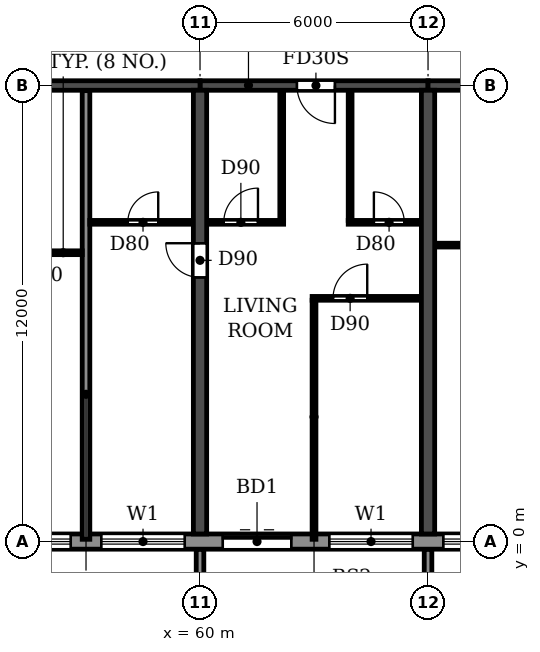
"""IFC4 building model, lengths in metres.
Left out: names, types, materials, properties, quantities, classifications, styles, units other than length and angle.
Written with IfcOpenShell. Run it as: python <this file> out.ifc"""

import sys

from ifc_helpers import new_model, si_unit, direction, frame, frame_2d, origin, place, context, subcontext, project, spatial, polyline, rectangle, outline, extrude, source, transform, mapped, element, fill, save


model = new_model("IFC4")
c1 = context("Model", 3, precision=1e-05, world=origin(), true_north=direction((0.0, 1.0)))
c2 = subcontext(c1, "Body", "Model", "MODEL_VIEW")
j1 = project(units=[si_unit("LENGTHUNIT", "METRE"), si_unit("PLANEANGLEUNIT", "RADIAN")], contexts=[c1])
p1 = place(None, origin())
s1 = spatial("IfcSite", under=j1, at=p1, CompositionType="ELEMENT")
p2 = place(p1, origin())
s2 = spatial("IfcBuilding", under=s1, at=p2, CompositionType="ELEMENT")
p3 = place(p2, frame((0.0, 0.0, 76.2)))
s3 = spatial("IfcBuildingStorey", under=s2, at=p3, CompositionType="ELEMENT", Elevation=76.2)
p4 = place(p3, frame((60.0, 0.2, 0.0), z_axis=(0.0, 0.0, 1.0), x_axis=(0.0, 1.0, 0.0)))
e1 = element("IfcWall", 1, at=p4, inside=s3, PredefinedType="SHEAR", context=c2, shape_type="SweptSolid", body=[
    extrude(rectangle(XDim=11.675, YDim=0.35, at=frame_2d((5.837, 0.0))), origin(), (0.0, 0.0, 1.0), 3.06),
])
p5 = place(p4, frame((6.75, 0.0, 0.0)))
e2 = element("IfcOpeningElement", 2, at=p5, cuts=e1, PredefinedType="OPENING", context=c2, shape_type="SweptSolid", body=[
    extrude(rectangle(XDim=0.9, YDim=2.1, at=frame_2d((0.45, 1.05))), frame((0.0, 0.185, 0.0), z_axis=(0.0, -1.0, 0.0), x_axis=(1.0, 0.0, 0.0)), (0.0, 0.0, 1.0), 0.37),
])
p6 = place(p3, frame((66.0, 0.2, 0.0), z_axis=(0.0, 0.0, 1.0), x_axis=(0.0, 1.0, 0.0)))
e3 = element("IfcWall", 3, at=p6, inside=s3, PredefinedType="SHEAR", context=c2, shape_type="SweptSolid", body=[
    extrude(rectangle(XDim=11.675, YDim=0.35, at=frame_2d((5.837, 0.0))), origin(), (0.0, 0.0, 1.0), 3.06),
])
p7 = place(p3, frame((54.0, 12.0, 0.0), z_axis=(0.0, 0.0, 1.0), x_axis=(1.0, 0.0, 0.0)))
e4 = element("IfcWall", 4, at=p7, inside=s3, PredefinedType="SHEAR", context=c2, shape_type="SweptSolid", body=[
    extrude(rectangle(XDim=6.0, YDim=0.25, at=frame_2d((3.0, 0.0))), origin(), (0.0, 0.0, 1.0), 2.46),
])
p8 = place(p3, frame((60.0, 12.0, 0.0), z_axis=(0.0, 0.0, 1.0), x_axis=(1.0, 0.0, 0.0)))
e5 = element("IfcWall", 5, at=p8, inside=s3, PredefinedType="SHEAR", context=c2, shape_type="SweptSolid", body=[
    extrude(rectangle(XDim=6.0, YDim=0.25, at=frame_2d((3.0, 0.0))), origin(), (0.0, 0.0, 1.0), 2.46),
])
p9 = place(p8, frame((2.55, 0.0, 0.0)))
e6 = element("IfcOpeningElement", 6, at=p9, cuts=e5, PredefinedType="OPENING", context=c2, shape_type="SweptSolid", body=[
    extrude(rectangle(XDim=1.0, YDim=2.1, at=frame_2d((0.5, 1.05))), frame((0.0, 0.135, 0.0), z_axis=(0.0, -1.0, 0.0), x_axis=(1.0, 0.0, 0.0)), (0.0, 0.0, 1.0), 0.27),
])
p10 = place(p3, frame((66.0, 12.0, 0.0), z_axis=(0.0, 0.0, 1.0), x_axis=(1.0, 0.0, 0.0)))
e7 = element("IfcWall", 7, at=p10, inside=s3, PredefinedType="SHEAR", context=c2, shape_type="SweptSolid", body=[
    extrude(rectangle(XDim=6.0, YDim=0.25, at=frame_2d((3.0, 0.0))), origin(), (0.0, 0.0, 1.0), 2.46),
])
p11 = place(p10, frame((2.55, 0.0, 0.0)))
e8 = element("IfcOpeningElement", 8, at=p11, cuts=e7, PredefinedType="OPENING", context=c2, shape_type="SweptSolid", body=[
    extrude(rectangle(XDim=1.0, YDim=2.1, at=frame_2d((0.5, 1.05))), frame((0.0, 0.135, 0.0), z_axis=(0.0, -1.0, 0.0), x_axis=(1.0, 0.0, 0.0)), (0.0, 0.0, 1.0), 0.27),
])
p12 = place(p3, frame((10.683, 0.0, 0.0), z_axis=(0.0, 0.0, 1.0), x_axis=(1.0, 0.0, 0.0)))
e9 = element("IfcWall", 9, at=p12, inside=s3, PredefinedType="STANDARD", context=c2, shape_type="SweptSolid", body=[
    extrude(rectangle(XDim=80.634, YDim=0.4, at=frame_2d((40.317, 0.0))), origin(), (0.0, 0.0, 1.0), 3.06),
])
p13 = place(p12, frame((1.717, 0.0, 0.9)))
e10 = element("IfcOpeningElement", 10, at=p13, cuts=e9, PredefinedType="OPENING", context=c2, shape_type="SweptSolid", body=[
    extrude(rectangle(XDim=2.2, YDim=1.5, at=frame_2d((1.1, 0.75))), frame((0.0, 0.21, 0.0), z_axis=(0.0, -1.0, 0.0), x_axis=(1.0, 0.0, 0.0)), (0.0, 0.0, 1.0), 0.42),
])
p14 = place(p12, frame((4.917, 0.0, 0.0)))
e11 = element("IfcOpeningElement", 11, at=p14, cuts=e9, PredefinedType="OPENING", context=c2, shape_type="SweptSolid", body=[
    extrude(rectangle(XDim=1.8, YDim=2.4, at=frame_2d((0.9, 1.2))), frame((0.0, 0.21, 0.0), z_axis=(0.0, -1.0, 0.0), x_axis=(1.0, 0.0, 0.0)), (0.0, 0.0, 1.0), 0.42),
])
p15 = place(p12, frame((7.717, 0.0, 0.9)))
e12 = element("IfcOpeningElement", 12, at=p15, cuts=e9, PredefinedType="OPENING", context=c2, shape_type="SweptSolid", body=[
    extrude(rectangle(XDim=2.2, YDim=1.5, at=frame_2d((1.1, 0.75))), frame((0.0, 0.21, 0.0), z_axis=(0.0, -1.0, 0.0), x_axis=(1.0, 0.0, 0.0)), (0.0, 0.0, 1.0), 0.42),
])
p16 = place(p12, frame((10.717, 0.0, 0.9)))
e13 = element("IfcOpeningElement", 13, at=p16, cuts=e9, PredefinedType="OPENING", context=c2, shape_type="SweptSolid", body=[
    extrude(rectangle(XDim=2.2, YDim=1.5, at=frame_2d((1.1, 0.75))), frame((0.0, 0.21, 0.0), z_axis=(0.0, -1.0, 0.0), x_axis=(1.0, 0.0, 0.0)), (0.0, 0.0, 1.0), 0.42),
])
p17 = place(p12, frame((13.717, 0.0, 0.9)))
e14 = element("IfcOpeningElement", 14, at=p17, cuts=e9, PredefinedType="OPENING", context=c2, shape_type="SweptSolid", body=[
    extrude(rectangle(XDim=2.2, YDim=1.5, at=frame_2d((1.1, 0.75))), frame((0.0, 0.21, 0.0), z_axis=(0.0, -1.0, 0.0), x_axis=(1.0, 0.0, 0.0)), (0.0, 0.0, 1.0), 0.42),
])
p18 = place(p12, frame((16.917, 0.0, 0.0)))
e15 = element("IfcOpeningElement", 15, at=p18, cuts=e9, PredefinedType="OPENING", context=c2, shape_type="SweptSolid", body=[
    extrude(rectangle(XDim=1.8, YDim=2.4, at=frame_2d((0.9, 1.2))), frame((0.0, 0.21, 0.0), z_axis=(0.0, -1.0, 0.0), x_axis=(1.0, 0.0, 0.0)), (0.0, 0.0, 1.0), 0.42),
])
p19 = place(p12, frame((19.717, 0.0, 0.9)))
e16 = element("IfcOpeningElement", 16, at=p19, cuts=e9, PredefinedType="OPENING", context=c2, shape_type="SweptSolid", body=[
    extrude(rectangle(XDim=2.2, YDim=1.5, at=frame_2d((1.1, 0.75))), frame((0.0, 0.21, 0.0), z_axis=(0.0, -1.0, 0.0), x_axis=(1.0, 0.0, 0.0)), (0.0, 0.0, 1.0), 0.42),
])
p20 = place(p12, frame((22.717, 0.0, 0.9)))
e17 = element("IfcOpeningElement", 17, at=p20, cuts=e9, PredefinedType="OPENING", context=c2, shape_type="SweptSolid", body=[
    extrude(rectangle(XDim=2.2, YDim=1.5, at=frame_2d((1.1, 0.75))), frame((0.0, 0.21, 0.0), z_axis=(0.0, -1.0, 0.0), x_axis=(1.0, 0.0, 0.0)), (0.0, 0.0, 1.0), 0.42),
])
p21 = place(p12, frame((25.917, 0.0, 0.0)))
e18 = element("IfcOpeningElement", 18, at=p21, cuts=e9, PredefinedType="OPENING", context=c2, shape_type="SweptSolid", body=[
    extrude(rectangle(XDim=1.8, YDim=2.4, at=frame_2d((0.9, 1.2))), frame((0.0, 0.21, 0.0), z_axis=(0.0, -1.0, 0.0), x_axis=(1.0, 0.0, 0.0)), (0.0, 0.0, 1.0), 0.42),
])
p22 = place(p12, frame((28.717, 0.0, 0.9)))
e19 = element("IfcOpeningElement", 19, at=p22, cuts=e9, PredefinedType="OPENING", context=c2, shape_type="SweptSolid", body=[
    extrude(rectangle(XDim=2.2, YDim=1.5, at=frame_2d((1.1, 0.75))), frame((0.0, 0.21, 0.0), z_axis=(0.0, -1.0, 0.0), x_axis=(1.0, 0.0, 0.0)), (0.0, 0.0, 1.0), 0.42),
])
p23 = place(p12, frame((31.717, 0.0, 0.9)))
e20 = element("IfcOpeningElement", 20, at=p23, cuts=e9, PredefinedType="OPENING", context=c2, shape_type="SweptSolid", body=[
    extrude(rectangle(XDim=2.2, YDim=1.5, at=frame_2d((1.1, 0.75))), frame((0.0, 0.21, 0.0), z_axis=(0.0, -1.0, 0.0), x_axis=(1.0, 0.0, 0.0)), (0.0, 0.0, 1.0), 0.42),
])
p24 = place(p12, frame((34.717, 0.0, 0.9)))
e21 = element("IfcOpeningElement", 21, at=p24, cuts=e9, PredefinedType="OPENING", context=c2, shape_type="SweptSolid", body=[
    extrude(rectangle(XDim=2.2, YDim=1.5, at=frame_2d((1.1, 0.75))), frame((0.0, 0.21, 0.0), z_axis=(0.0, -1.0, 0.0), x_axis=(1.0, 0.0, 0.0)), (0.0, 0.0, 1.0), 0.42),
])
p25 = place(p12, frame((37.917, 0.0, 0.0)))
e22 = element("IfcOpeningElement", 22, at=p25, cuts=e9, PredefinedType="OPENING", context=c2, shape_type="SweptSolid", body=[
    extrude(rectangle(XDim=1.8, YDim=2.4, at=frame_2d((0.9, 1.2))), frame((0.0, 0.21, 0.0), z_axis=(0.0, -1.0, 0.0), x_axis=(1.0, 0.0, 0.0)), (0.0, 0.0, 1.0), 0.42),
])
p26 = place(p12, frame((40.717, 0.0, 0.9)))
e23 = element("IfcOpeningElement", 23, at=p26, cuts=e9, PredefinedType="OPENING", context=c2, shape_type="SweptSolid", body=[
    extrude(rectangle(XDim=2.2, YDim=1.5, at=frame_2d((1.1, 0.75))), frame((0.0, 0.21, 0.0), z_axis=(0.0, -1.0, 0.0), x_axis=(1.0, 0.0, 0.0)), (0.0, 0.0, 1.0), 0.42),
])
p27 = place(p12, frame((43.717, 0.0, 0.9)))
e24 = element("IfcOpeningElement", 24, at=p27, cuts=e9, PredefinedType="OPENING", context=c2, shape_type="SweptSolid", body=[
    extrude(rectangle(XDim=2.2, YDim=1.5, at=frame_2d((1.1, 0.75))), frame((0.0, 0.21, 0.0), z_axis=(0.0, -1.0, 0.0), x_axis=(1.0, 0.0, 0.0)), (0.0, 0.0, 1.0), 0.42),
])
p28 = place(p12, frame((46.717, 0.0, 0.9)))
e25 = element("IfcOpeningElement", 25, at=p28, cuts=e9, PredefinedType="OPENING", context=c2, shape_type="SweptSolid", body=[
    extrude(rectangle(XDim=2.2, YDim=1.5, at=frame_2d((1.1, 0.75))), frame((0.0, 0.21, 0.0), z_axis=(0.0, -1.0, 0.0), x_axis=(1.0, 0.0, 0.0)), (0.0, 0.0, 1.0), 0.42),
])
p29 = place(p12, frame((49.917, 0.0, 0.0)))
e26 = element("IfcOpeningElement", 26, at=p29, cuts=e9, PredefinedType="OPENING", context=c2, shape_type="SweptSolid", body=[
    extrude(rectangle(XDim=1.8, YDim=2.4, at=frame_2d((0.9, 1.2))), frame((0.0, 0.21, 0.0), z_axis=(0.0, -1.0, 0.0), x_axis=(1.0, 0.0, 0.0)), (0.0, 0.0, 1.0), 0.42),
])
p30 = place(p12, frame((52.717, 0.0, 0.9)))
e27 = element("IfcOpeningElement", 27, at=p30, cuts=e9, PredefinedType="OPENING", context=c2, shape_type="SweptSolid", body=[
    extrude(rectangle(XDim=2.2, YDim=1.5, at=frame_2d((1.1, 0.75))), frame((0.0, 0.21, 0.0), z_axis=(0.0, -1.0, 0.0), x_axis=(1.0, 0.0, 0.0)), (0.0, 0.0, 1.0), 0.42),
])
p31 = place(p12, frame((55.717, 0.0, 0.9)))
e28 = element("IfcOpeningElement", 28, at=p31, cuts=e9, PredefinedType="OPENING", context=c2, shape_type="SweptSolid", body=[
    extrude(rectangle(XDim=2.2, YDim=1.5, at=frame_2d((1.1, 0.75))), frame((0.0, 0.21, 0.0), z_axis=(0.0, -1.0, 0.0), x_axis=(1.0, 0.0, 0.0)), (0.0, 0.0, 1.0), 0.42),
])
p32 = place(p12, frame((58.717, 0.0, 0.9)))
e29 = element("IfcOpeningElement", 29, at=p32, cuts=e9, PredefinedType="OPENING", context=c2, shape_type="SweptSolid", body=[
    extrude(rectangle(XDim=2.2, YDim=1.5, at=frame_2d((1.1, 0.75))), frame((0.0, 0.21, 0.0), z_axis=(0.0, -1.0, 0.0), x_axis=(1.0, 0.0, 0.0)), (0.0, 0.0, 1.0), 0.42),
])
p33 = place(p12, frame((61.717, 0.0, 0.9)))
e30 = element("IfcOpeningElement", 30, at=p33, cuts=e9, PredefinedType="OPENING", context=c2, shape_type="SweptSolid", body=[
    extrude(rectangle(XDim=2.2, YDim=1.5, at=frame_2d((1.1, 0.75))), frame((0.0, 0.21, 0.0), z_axis=(0.0, -1.0, 0.0), x_axis=(1.0, 0.0, 0.0)), (0.0, 0.0, 1.0), 0.42),
])
p34 = place(p12, frame((64.917, 0.0, 0.0)))
e31 = element("IfcOpeningElement", 31, at=p34, cuts=e9, PredefinedType="OPENING", context=c2, shape_type="SweptSolid", body=[
    extrude(rectangle(XDim=1.8, YDim=2.4, at=frame_2d((0.9, 1.2))), frame((0.0, 0.21, 0.0), z_axis=(0.0, -1.0, 0.0), x_axis=(1.0, 0.0, 0.0)), (0.0, 0.0, 1.0), 0.42),
])
p35 = place(p12, frame((67.717, 0.0, 0.9)))
e32 = element("IfcOpeningElement", 32, at=p35, cuts=e9, PredefinedType="OPENING", context=c2, shape_type="SweptSolid", body=[
    extrude(rectangle(XDim=2.2, YDim=1.5, at=frame_2d((1.1, 0.75))), frame((0.0, 0.21, 0.0), z_axis=(0.0, -1.0, 0.0), x_axis=(1.0, 0.0, 0.0)), (0.0, 0.0, 1.0), 0.42),
])
p36 = place(p12, frame((70.717, 0.0, 0.9)))
e33 = element("IfcOpeningElement", 33, at=p36, cuts=e9, PredefinedType="OPENING", context=c2, shape_type="SweptSolid", body=[
    extrude(rectangle(XDim=2.2, YDim=1.5, at=frame_2d((1.1, 0.75))), frame((0.0, 0.21, 0.0), z_axis=(0.0, -1.0, 0.0), x_axis=(1.0, 0.0, 0.0)), (0.0, 0.0, 1.0), 0.42),
])
p37 = place(p12, frame((73.917, 0.0, 0.0)))
e34 = element("IfcOpeningElement", 34, at=p37, cuts=e9, PredefinedType="OPENING", context=c2, shape_type="SweptSolid", body=[
    extrude(rectangle(XDim=1.8, YDim=2.4, at=frame_2d((0.9, 1.2))), frame((0.0, 0.21, 0.0), z_axis=(0.0, -1.0, 0.0), x_axis=(1.0, 0.0, 0.0)), (0.0, 0.0, 1.0), 0.42),
])
p38 = place(p12, frame((76.717, 0.0, 0.9)))
e35 = element("IfcOpeningElement", 35, at=p38, cuts=e9, PredefinedType="OPENING", context=c2, shape_type="SweptSolid", body=[
    extrude(rectangle(XDim=2.2, YDim=1.5, at=frame_2d((1.1, 0.75))), frame((0.0, 0.21, 0.0), z_axis=(0.0, -1.0, 0.0), x_axis=(1.0, 0.0, 0.0)), (0.0, 0.0, 1.0), 0.42),
])
m1 = source(origin(), c2, "Body", "SweptSolid", [
    extrude(outline(polyline([(0.0, 0.0), (0.2, 0.0), (0.2, 1.65), (0.0, 1.65), (0.0, 0.0)])), origin(), (0.0, 0.0, 1.0), 3.1),
])
for number, where in (
    (36, (59.9, -1.85, 0.0)),
    (37, (65.9, -1.85, 0.0)),
):
    element("IfcWall", number, at=place(p3, frame(where)), inside=s3, PredefinedType="STANDARD", context=c2, shape_type="MappedRepresentation", body=[
        mapped(m1, transform((0.0, 0.0, 0.0))),
    ])
p39 = place(p3, frame((57.0, 0.06, 0.0), z_axis=(0.0, 0.0, 1.0), x_axis=(0.0, 1.0, 0.0)))
e38 = element("IfcWall", 38, at=p39, inside=s3, PredefinedType="PARTITIONING", context=c2, shape_type="SweptSolid", body=[
    extrude(rectangle(XDim=11.805, YDim=0.2, at=frame_2d((5.902, 0.0))), origin(), (0.0, 0.0, 1.0), 3.06),
])
p40 = place(p3, frame((62.95, 6.4, 0.0), z_axis=(0.0, 0.0, 1.0), x_axis=(1.0, 0.0, 0.0)))
e39 = element("IfcWall", 39, at=p40, inside=s3, PredefinedType="PARTITIONING", context=c2, shape_type="SweptSolid", body=[
    extrude(rectangle(XDim=2.865, YDim=0.1, at=frame_2d((1.433, 0.0))), origin(), (0.0, 0.0, 1.0), 3.06),
])
p41 = place(p40, frame((0.55, 0.0, 0.0)))
e40 = element("IfcOpeningElement", 40, at=p41, cuts=e39, PredefinedType="OPENING", context=c2, shape_type="SweptSolid", body=[
    extrude(rectangle(XDim=0.9, YDim=2.1, at=frame_2d((0.45, 1.05))), frame((0.0, 0.06, 0.0), z_axis=(0.0, -1.0, 0.0), x_axis=(1.0, 0.0, 0.0)), (0.0, 0.0, 1.0), 0.12),
])
p42 = place(p3, frame((54.185, 7.6, 0.0), z_axis=(0.0, 0.0, 1.0), x_axis=(1.0, 0.0, 0.0)))
e41 = element("IfcWall", 41, at=p42, inside=s3, PredefinedType="PARTITIONING", context=c2, shape_type="SweptSolid", body=[
    extrude(rectangle(XDim=2.715, YDim=0.1, at=frame_2d((1.357, 0.0))), origin(), (0.0, 0.0, 1.0), 3.06),
])
p43 = place(p42, frame((0.915, 0.0, 0.0)))
e42 = element("IfcOpeningElement", 42, at=p43, cuts=e41, PredefinedType="OPENING", context=c2, shape_type="SweptSolid", body=[
    extrude(rectangle(XDim=0.8, YDim=2.1, at=frame_2d((0.4, 1.05))), frame((0.0, 0.06, 0.0), z_axis=(0.0, -1.0, 0.0), x_axis=(1.0, 0.0, 0.0)), (0.0, 0.0, 1.0), 0.12),
])
p44 = place(p3, frame((66.185, 7.8, 0.0), z_axis=(0.0, 0.0, 1.0), x_axis=(1.0, 0.0, 0.0)))
e43 = element("IfcWall", 43, at=p44, inside=s3, PredefinedType="PARTITIONING", context=c2, shape_type="SweptSolid", body=[
    extrude(rectangle(XDim=2.015, YDim=0.1, at=frame_2d((1.007, 0.0))), origin(), (0.0, 0.0, 1.0), 3.06),
])
p45 = place(p3, frame((57.1, 8.4, 0.0), z_axis=(0.0, 0.0, 1.0), x_axis=(1.0, 0.0, 0.0)))
e44 = element("IfcWall", 44, at=p45, inside=s3, PredefinedType="PARTITIONING", context=c2, shape_type="SweptSolid", body=[
    extrude(rectangle(XDim=2.715, YDim=0.1, at=frame_2d((1.357, 0.0))), origin(), (0.0, 0.0, 1.0), 3.06),
])
p46 = place(p45, frame((1.0, 0.0, 0.0)))
e45 = element("IfcOpeningElement", 45, at=p46, cuts=e44, PredefinedType="OPENING", context=c2, shape_type="SweptSolid", body=[
    extrude(rectangle(XDim=0.8, YDim=2.1, at=frame_2d((0.4, 1.05))), frame((0.0, 0.06, 0.0), z_axis=(0.0, -1.0, 0.0), x_axis=(1.0, 0.0, 0.0)), (0.0, 0.0, 1.0), 0.12),
])
p47 = place(p3, frame((60.185, 8.4, 0.0), z_axis=(0.0, 0.0, 1.0), x_axis=(1.0, 0.0, 0.0)))
e46 = element("IfcWall", 46, at=p47, inside=s3, PredefinedType="PARTITIONING", context=c2, shape_type="SweptSolid", body=[
    extrude(rectangle(XDim=2.015, YDim=0.1, at=frame_2d((1.007, 0.0))), origin(), (0.0, 0.0, 1.0), 3.06),
])
p48 = place(p47, frame((0.44, 0.0, 0.0)))
e47 = element("IfcOpeningElement", 47, at=p48, cuts=e46, PredefinedType="OPENING", context=c2, shape_type="SweptSolid", body=[
    extrude(rectangle(XDim=0.9, YDim=2.1, at=frame_2d((0.45, 1.05))), frame((0.0, 0.06, 0.0), z_axis=(0.0, -1.0, 0.0), x_axis=(1.0, 0.0, 0.0)), (0.0, 0.0, 1.0), 0.12),
])
p49 = place(p3, frame((63.9, 8.4, 0.0), z_axis=(0.0, 0.0, 1.0), x_axis=(1.0, 0.0, 0.0)))
e48 = element("IfcWall", 48, at=p49, inside=s3, PredefinedType="PARTITIONING", context=c2, shape_type="SweptSolid", body=[
    extrude(rectangle(XDim=1.915, YDim=0.1, at=frame_2d((0.958, 0.0))), origin(), (0.0, 0.0, 1.0), 3.06),
])
p50 = place(p49, frame((0.675, 0.0, 0.0)))
e49 = element("IfcOpeningElement", 49, at=p50, cuts=e48, PredefinedType="OPENING", context=c2, shape_type="SweptSolid", body=[
    extrude(rectangle(XDim=0.8, YDim=2.1, at=frame_2d((0.4, 1.05))), frame((0.0, 0.06, 0.0), z_axis=(0.0, -1.0, 0.0), x_axis=(1.0, 0.0, 0.0)), (0.0, 0.0, 1.0), 0.12),
])
p51 = place(p3, frame((62.15, 8.45, 0.0), z_axis=(0.0, 0.0, 1.0), x_axis=(0.0, 1.0, 0.0)))
e50 = element("IfcWall", 50, at=p51, inside=s3, PredefinedType="PARTITIONING", context=c2, shape_type="SweptSolid", body=[
    extrude(rectangle(XDim=3.415, YDim=0.1, at=frame_2d((1.708, 0.0))), origin(), (0.0, 0.0, 1.0), 3.06),
])
p52 = place(p3, frame((63.0, 0.06, 0.0), z_axis=(0.0, 0.0, 1.0), x_axis=(0.0, 1.0, 0.0)))
e51 = element("IfcWall", 51, at=p52, inside=s3, PredefinedType="PARTITIONING", context=c2, shape_type="SweptSolid", body=[
    extrude(rectangle(XDim=6.29, YDim=0.1, at=frame_2d((3.145, 0.0))), origin(), (0.0, 0.0, 1.0), 3.06),
])
p53 = place(p3, frame((63.95, 8.45, 0.0), z_axis=(0.0, 0.0, 1.0), x_axis=(0.0, 1.0, 0.0)))
e52 = element("IfcWall", 52, at=p53, inside=s3, PredefinedType="PARTITIONING", context=c2, shape_type="SweptSolid", body=[
    extrude(rectangle(XDim=3.415, YDim=0.1, at=frame_2d((1.708, 0.0))), origin(), (0.0, 0.0, 1.0), 3.06),
])
p54 = place(p27, origin())
e53 = element("IfcWindow", 53, at=p54, inside=s3, PartitioningType="DOUBLE_PANEL_HORIZONTAL", PredefinedType="WINDOW", context=c2, shape_type="SweptSolid", body=[
    extrude(rectangle(XDim=2.2, YDim=1.5, at=frame_2d((1.1, 0.75))), frame((0.0, 0.03, 0.0), z_axis=(0.0, -1.0, 0.0), x_axis=(1.0, 0.0, 0.0)), (0.0, 0.0, 1.0), 0.06),
])
fill(e24, e53)
p55 = place(p28, origin())
e54 = element("IfcWindow", 54, at=p55, inside=s3, PartitioningType="DOUBLE_PANEL_HORIZONTAL", PredefinedType="WINDOW", context=c2, shape_type="SweptSolid", body=[
    extrude(rectangle(XDim=2.2, YDim=1.5, at=frame_2d((1.1, 0.75))), frame((0.0, 0.03, 0.0), z_axis=(0.0, -1.0, 0.0), x_axis=(1.0, 0.0, 0.0)), (0.0, 0.0, 1.0), 0.06),
])
fill(e25, e54)
p56 = place(p29, origin())
e55 = element("IfcDoor", 55, at=p56, inside=s3, OperationType="DOUBLE_DOOR_SLIDING", PredefinedType="DOOR", context=c2, shape_type="SweptSolid", body=[
    extrude(rectangle(XDim=1.8, YDim=2.4, at=frame_2d((0.9, 1.2))), frame((0.0, 0.025, 0.0), z_axis=(0.0, -1.0, 0.0), x_axis=(1.0, 0.0, 0.0)), (0.0, 0.0, 1.0), 0.05),
])
fill(e26, e55)
p57 = place(p30, origin())
e56 = element("IfcWindow", 56, at=p57, inside=s3, PartitioningType="DOUBLE_PANEL_HORIZONTAL", PredefinedType="WINDOW", context=c2, shape_type="SweptSolid", body=[
    extrude(rectangle(XDim=2.2, YDim=1.5, at=frame_2d((1.1, 0.75))), frame((0.0, 0.03, 0.0), z_axis=(0.0, -1.0, 0.0), x_axis=(1.0, 0.0, 0.0)), (0.0, 0.0, 1.0), 0.06),
])
fill(e27, e56)
p58 = place(p31, origin())
e57 = element("IfcWindow", 57, at=p58, inside=s3, PartitioningType="DOUBLE_PANEL_HORIZONTAL", PredefinedType="WINDOW", context=c2, shape_type="SweptSolid", body=[
    extrude(rectangle(XDim=2.2, YDim=1.5, at=frame_2d((1.1, 0.75))), frame((0.0, 0.03, 0.0), z_axis=(0.0, -1.0, 0.0), x_axis=(1.0, 0.0, 0.0)), (0.0, 0.0, 1.0), 0.06),
])
fill(e28, e57)
p59 = place(p46, origin())
e58 = element("IfcDoor", 58, at=p59, inside=s3, OperationType="SINGLE_SWING_RIGHT", PredefinedType="DOOR", context=c2, shape_type="SweptSolid", body=[
    extrude(rectangle(XDim=0.8, YDim=2.1, at=frame_2d((0.4, 1.05))), frame((0.0, 0.025, 0.0), z_axis=(0.0, -1.0, 0.0), x_axis=(1.0, 0.0, 0.0)), (0.0, 0.0, 1.0), 0.05),
])
fill(e45, e58)
p60 = place(p5, origin())
e59 = element("IfcDoor", 59, at=p60, inside=s3, OperationType="SINGLE_SWING_RIGHT", PredefinedType="DOOR", context=c2, shape_type="SweptSolid", body=[
    extrude(rectangle(XDim=0.9, YDim=2.1, at=frame_2d((0.45, 1.05))), frame((0.0, 0.025, 0.0), z_axis=(0.0, -1.0, 0.0), x_axis=(1.0, 0.0, 0.0)), (0.0, 0.0, 1.0), 0.05),
])
fill(e2, e59)
p61 = place(p48, origin())
e60 = element("IfcDoor", 60, at=p61, inside=s3, OperationType="SINGLE_SWING_RIGHT", PredefinedType="DOOR", context=c2, shape_type="SweptSolid", body=[
    extrude(rectangle(XDim=0.9, YDim=2.1, at=frame_2d((0.45, 1.05))), frame((0.0, 0.025, 0.0), z_axis=(0.0, -1.0, 0.0), x_axis=(1.0, 0.0, 0.0)), (0.0, 0.0, 1.0), 0.05),
])
fill(e47, e60)
p62 = place(p9, frame((1.0, 0.0, 0.0), z_axis=(0.0, 0.0, 1.0), x_axis=(-1.0, 0.0, 0.0)))
e61 = element("IfcDoor", 61, at=p62, inside=s3, OperationType="SINGLE_SWING_LEFT", PredefinedType="DOOR", context=c2, shape_type="SweptSolid", body=[
    extrude(rectangle(XDim=1.0, YDim=2.1, at=frame_2d((0.5, 1.05))), frame((0.0, 0.025, 0.0), z_axis=(0.0, -1.0, 0.0), x_axis=(1.0, 0.0, 0.0)), (0.0, 0.0, 1.0), 0.05),
])
fill(e6, e61)
p63 = place(p41, origin())
e62 = element("IfcDoor", 62, at=p63, inside=s3, OperationType="SINGLE_SWING_RIGHT", PredefinedType="DOOR", context=c2, shape_type="SweptSolid", body=[
    extrude(rectangle(XDim=0.9, YDim=2.1, at=frame_2d((0.45, 1.05))), frame((0.0, 0.025, 0.0), z_axis=(0.0, -1.0, 0.0), x_axis=(1.0, 0.0, 0.0)), (0.0, 0.0, 1.0), 0.05),
])
fill(e40, e62)
p64 = place(p50, origin())
e63 = element("IfcDoor", 63, at=p64, inside=s3, OperationType="SINGLE_SWING_LEFT", PredefinedType="DOOR", context=c2, shape_type="SweptSolid", body=[
    extrude(rectangle(XDim=0.8, YDim=2.1, at=frame_2d((0.4, 1.05))), frame((0.0, 0.025, 0.0), z_axis=(0.0, -1.0, 0.0), x_axis=(1.0, 0.0, 0.0)), (0.0, 0.0, 1.0), 0.05),
])
fill(e49, e63)
save(model, sys.argv[1])
